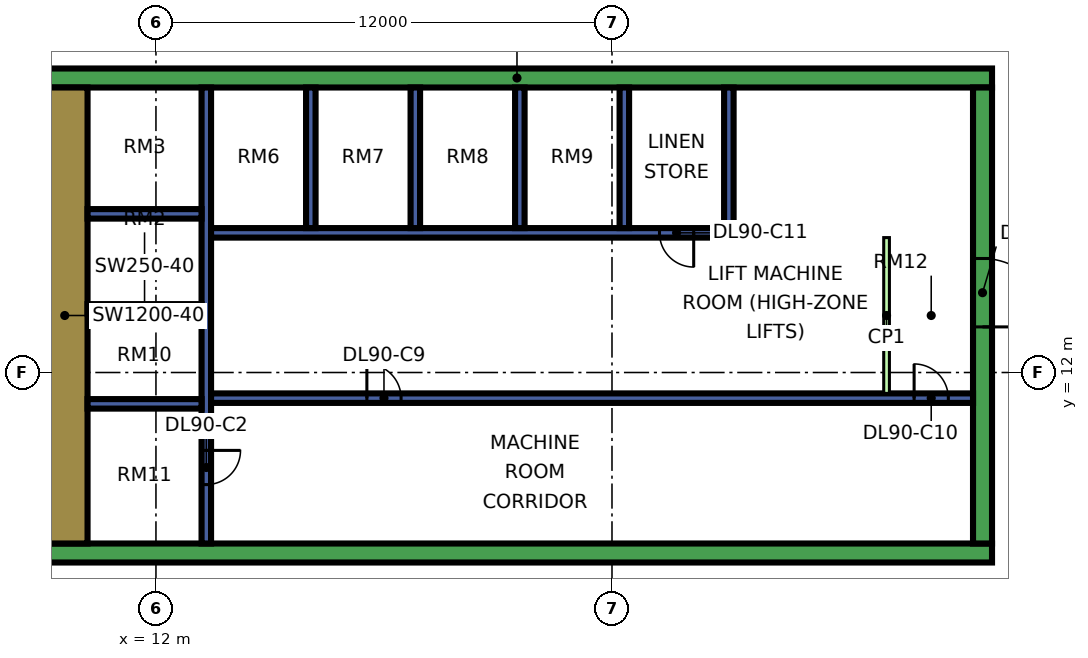
"""IFC4 building model, lengths in metres.
Left out: names, types, materials, properties, quantities, classifications, styles, units other than length and angle.
Written with IfcOpenShell. Run it as: python <this file> out.ifc"""

import sys

from ifc_helpers import new_model, si_unit, direction, frame, frame_2d, origin, place, context, subcontext, project, spatial, rectangle, extrude, element, fill, save


model = new_model("IFC4")
c1 = context("Model", 3, precision=1e-05, world=origin(), true_north=direction((0.0, 1.0)))
c2 = subcontext(c1, "Body", "Model", "MODEL_VIEW")
j1 = project(units=[si_unit("LENGTHUNIT", "METRE"), si_unit("PLANEANGLEUNIT", "RADIAN")], contexts=[c1])
p1 = place(None, origin())
s1 = spatial("IfcSite", under=j1, at=p1, CompositionType="ELEMENT")
p2 = place(p1, origin())
s2 = spatial("IfcBuilding", under=s1, at=p2, CompositionType="ELEMENT")
p3 = place(p2, frame((0.0, 0.0, 383.9)))
s3 = spatial("IfcBuildingStorey", under=s2, at=p3, CompositionType="ELEMENT", Elevation=383.9)
for number, where, z_axis, x_axis in (
    (1, (9.0, 7.25, 0.0), (0.0, 0.0, 1.0), (1.0, 0.0, 0.0)),
    (2, (9.0, 19.75, 0.0), (0.0, 0.0, 1.0), (1.0, 0.0, 0.0)),
):
    element("IfcWall", number, at=place(p3, frame(where, z_axis=z_axis, x_axis=x_axis)), inside=s3, PredefinedType="SHEAR", context=c2, shape_type="SweptSolid", body=[
        extrude(rectangle(XDim=25.0, YDim=0.5, at=frame_2d((12.5, 0.0))), origin(), (0.0, 0.0, 1.0), 5.0),
    ])
p4 = place(p3, frame((9.6, 7.5, 0.0), z_axis=(0.0, 0.0, 1.0), x_axis=(0.0, 1.0, 0.0)))
e3 = element("IfcWall", 3, at=p4, inside=s3, PredefinedType="SHEAR", context=c2, shape_type="SweptSolid", body=[
    extrude(rectangle(XDim=12.0, YDim=1.2, at=frame_2d((6.0, 0.0))), origin(), (0.0, 0.0, 1.0), 5.0),
])
p5 = place(p3, frame((33.75, 7.5, 0.0), z_axis=(0.0, 0.0, 1.0), x_axis=(0.0, 1.0, 0.0)))
e4 = element("IfcWall", 4, at=p5, inside=s3, PredefinedType="SHEAR", context=c2, shape_type="SweptSolid", body=[
    extrude(rectangle(XDim=12.0, YDim=0.5, at=frame_2d((6.0, 0.0))), origin(), (0.0, 0.0, 1.0), 5.0),
])
p6 = place(p5, frame((5.7, 0.0, 0.0)))
e5 = element("IfcOpeningElement", 5, at=p6, cuts=e4, PredefinedType="OPENING", context=c2, shape_type="SweptSolid", body=[
    extrude(rectangle(XDim=1.8, YDim=2.4, at=frame_2d((0.9, 1.2))), frame((0.0, 0.26, 0.0), z_axis=(0.0, -1.0, 0.0), x_axis=(1.0, 0.0, 0.0)), (0.0, 0.0, 1.0), 0.52),
])
p7 = place(p3, frame((13.325, 7.5, 0.0), z_axis=(0.0, 0.0, 1.0), x_axis=(0.0, 1.0, 0.0)))
e6 = element("IfcWall", 6, at=p7, inside=s3, PredefinedType="SHEAR", context=c2, shape_type="SweptSolid", body=[
    extrude(rectangle(XDim=12.0, YDim=0.25, at=frame_2d((6.0, 0.0))), origin(), (0.0, 0.0, 1.0), 5.0),
])
p8 = place(p7, frame((1.55, 0.0, 0.0)))
e7 = element("IfcOpeningElement", 7, at=p8, cuts=e6, PredefinedType="OPENING", context=c2, shape_type="SweptSolid", body=[
    extrude(rectangle(XDim=0.9, YDim=2.1, at=frame_2d((0.45, 1.05))), frame((0.0, 0.135, 0.0), z_axis=(0.0, -1.0, 0.0), x_axis=(1.0, 0.0, 0.0)), (0.0, 0.0, 1.0), 0.27),
])
p9 = place(p3, frame((13.45, 11.325, 0.0), z_axis=(0.0, 0.0, 1.0), x_axis=(1.0, 0.0, 0.0)))
e8 = element("IfcWall", 8, at=p9, inside=s3, PredefinedType="SHEAR", context=c2, shape_type="SweptSolid", body=[
    extrude(rectangle(XDim=20.05, YDim=0.25, at=frame_2d((10.025, 0.0))), origin(), (0.0, 0.0, 1.0), 5.0),
])
p10 = place(p9, frame((4.1, 0.0, 0.0)))
e9 = element("IfcOpeningElement", 9, at=p10, cuts=e8, PredefinedType="OPENING", context=c2, shape_type="SweptSolid", body=[
    extrude(rectangle(XDim=0.9, YDim=2.1, at=frame_2d((0.45, 1.05))), frame((0.0, 0.135, 0.0), z_axis=(0.0, -1.0, 0.0), x_axis=(1.0, 0.0, 0.0)), (0.0, 0.0, 1.0), 0.27),
])
p11 = place(p9, frame((18.5, 0.0, 0.0)))
e10 = element("IfcOpeningElement", 10, at=p11, cuts=e8, PredefinedType="OPENING", context=c2, shape_type="SweptSolid", body=[
    extrude(rectangle(XDim=0.9, YDim=2.1, at=frame_2d((0.45, 1.05))), frame((0.0, 0.135, 0.0), z_axis=(0.0, -1.0, 0.0), x_axis=(1.0, 0.0, 0.0)), (0.0, 0.0, 1.0), 0.27),
])
p12 = place(p3, frame((13.45, 15.675, 0.0), z_axis=(0.0, 0.0, 1.0), x_axis=(1.0, 0.0, 0.0)))
e11 = element("IfcWall", 11, at=p12, inside=s3, PredefinedType="SHEAR", context=c2, shape_type="SweptSolid", body=[
    extrude(rectangle(XDim=13.75, YDim=0.25, at=frame_2d((6.875, 0.0))), origin(), (0.0, 0.0, 1.0), 5.0),
])
p13 = place(p12, frame((11.8, 0.0, 0.0)))
e12 = element("IfcOpeningElement", 12, at=p13, cuts=e11, PredefinedType="OPENING", context=c2, shape_type="SweptSolid", body=[
    extrude(rectangle(XDim=0.9, YDim=2.1, at=frame_2d((0.45, 1.05))), frame((0.0, 0.135, 0.0), z_axis=(0.0, -1.0, 0.0), x_axis=(1.0, 0.0, 0.0)), (0.0, 0.0, 1.0), 0.27),
])
for number, where, z_axis, x_axis in (
    (13, (10.2, 11.175, 0.0), (0.0, 0.0, 1.0), (1.0, 0.0, 0.0)),
    (14, (10.2, 13.675, 0.0), (0.0, 0.0, 1.0), (1.0, 0.0, 0.0)),
    (15, (10.2, 16.175, 0.0), (0.0, 0.0, 1.0), (1.0, 0.0, 0.0)),
):
    element("IfcWall", number, at=place(p3, frame(where, z_axis=z_axis, x_axis=x_axis)), inside=s3, PredefinedType="SHEAR", context=c2, shape_type="SweptSolid", body=[
        extrude(rectangle(XDim=3.0, YDim=0.25, at=frame_2d((1.5, 0.0))), origin(), (0.0, 0.0, 1.0), 5.0),
    ])
for number, where, z_axis, x_axis in (
    (16, (16.075, 15.8, 0.0), (0.0, 0.0, 1.0), (0.0, 1.0, 0.0)),
    (17, (18.825, 15.8, 0.0), (0.0, 0.0, 1.0), (0.0, 1.0, 0.0)),
    (18, (21.575, 15.8, 0.0), (0.0, 0.0, 1.0), (0.0, 1.0, 0.0)),
    (19, (24.325, 15.8, 0.0), (0.0, 0.0, 1.0), (0.0, 1.0, 0.0)),
    (20, (27.075, 15.8, 0.0), (0.0, 0.0, 1.0), (0.0, 1.0, 0.0)),
):
    element("IfcWall", number, at=place(p3, frame(where, z_axis=z_axis, x_axis=x_axis)), inside=s3, PredefinedType="SHEAR", context=c2, shape_type="SweptSolid", body=[
        extrude(rectangle(XDim=3.7, YDim=0.25, at=frame_2d((1.85, 0.0))), origin(), (0.0, 0.0, 1.0), 5.0),
    ])
p14 = place(p3, frame((31.225, 11.45, 0.0), z_axis=(0.0, 0.0, 1.0), x_axis=(0.0, 1.0, 0.0)))
e21 = element("IfcWall", 21, at=p14, inside=s3, PredefinedType="PARTITIONING", context=c2, shape_type="SweptSolid", body=[
    extrude(rectangle(XDim=4.1, YDim=0.15, at=frame_2d((2.05, 0.0))), origin(), (0.0, 0.0, 1.0), 4.6),
])
p15 = place(p6, frame((1.8, 0.0, 0.0), z_axis=(0.0, 0.0, 1.0), x_axis=(-1.0, 0.0, 0.0)))
e22 = element("IfcDoor", 22, at=p15, inside=s3, OperationType="DOUBLE_DOOR_SINGLE_SWING", PredefinedType="DOOR", context=c2, shape_type="SweptSolid", body=[
    extrude(rectangle(XDim=1.8, YDim=2.4, at=frame_2d((0.9, 1.2))), frame((0.0, 0.025, 0.0), z_axis=(0.0, -1.0, 0.0), x_axis=(1.0, 0.0, 0.0)), (0.0, 0.0, 1.0), 0.05),
])
fill(e5, e22)
p16 = place(p8, origin())
e23 = element("IfcDoor", 23, at=p16, inside=s3, OperationType="SINGLE_SWING_RIGHT", PredefinedType="DOOR", context=c2, shape_type="SweptSolid", body=[
    extrude(rectangle(XDim=0.9, YDim=2.1, at=frame_2d((0.45, 1.05))), frame((0.0, 0.025, 0.0), z_axis=(0.0, -1.0, 0.0), x_axis=(1.0, 0.0, 0.0)), (0.0, 0.0, 1.0), 0.05),
])
fill(e7, e23)
p17 = place(p10, origin())
e24 = element("IfcDoor", 24, at=p17, inside=s3, OperationType="SINGLE_SWING_LEFT", PredefinedType="DOOR", context=c2, shape_type="SweptSolid", body=[
    extrude(rectangle(XDim=0.9, YDim=2.1, at=frame_2d((0.45, 1.05))), frame((0.0, 0.025, 0.0), z_axis=(0.0, -1.0, 0.0), x_axis=(1.0, 0.0, 0.0)), (0.0, 0.0, 1.0), 0.05),
])
fill(e9, e24)
p18 = place(p11, origin())
e25 = element("IfcDoor", 25, at=p18, inside=s3, OperationType="SINGLE_SWING_LEFT", PredefinedType="DOOR", context=c2, shape_type="SweptSolid", body=[
    extrude(rectangle(XDim=0.9, YDim=2.1, at=frame_2d((0.45, 1.05))), frame((0.0, 0.025, 0.0), z_axis=(0.0, -1.0, 0.0), x_axis=(1.0, 0.0, 0.0)), (0.0, 0.0, 1.0), 0.05),
])
fill(e10, e25)
p19 = place(p13, origin())
e26 = element("IfcDoor", 26, at=p19, inside=s3, OperationType="SINGLE_SWING_RIGHT", PredefinedType="DOOR", context=c2, shape_type="SweptSolid", body=[
    extrude(rectangle(XDim=0.9, YDim=2.1, at=frame_2d((0.45, 1.05))), frame((0.0, 0.025, 0.0), z_axis=(0.0, -1.0, 0.0), x_axis=(1.0, 0.0, 0.0)), (0.0, 0.0, 1.0), 0.05),
])
fill(e12, e26)
save(model, sys.argv[1])
